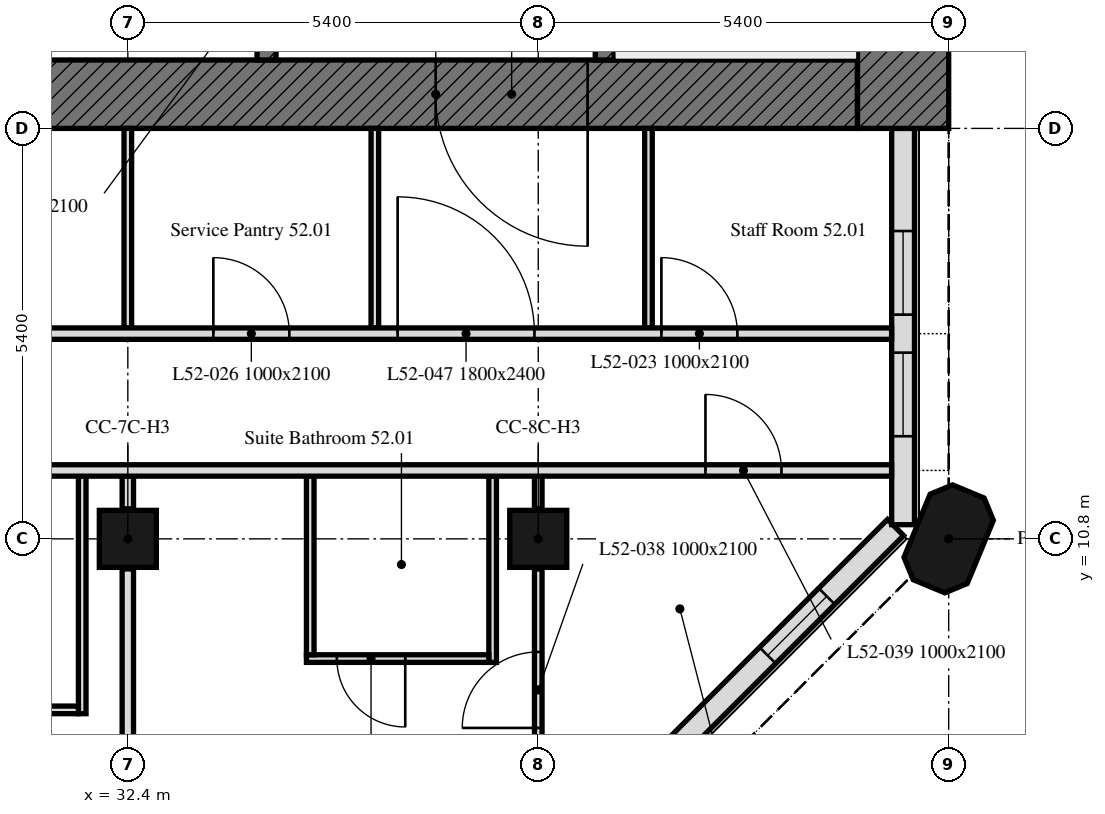
"""IFC4 building model, lengths in metres.
Left out: names, types, materials, properties, quantities, classifications, styles, units other than length and angle.
Written with IfcOpenShell. Run it as: python <this file> out.ifc"""

import sys

from ifc_helpers import new_model, si_unit, direction, frame, frame_2d, origin, origin_2d, place, context, subcontext, project, spatial, polyline, rectangle, outline, extrude, element, fill, save


model = new_model("IFC4")
c1 = context("Model", 3, precision=1e-05, world=origin(), true_north=direction((0.0, 1.0)))
c2 = subcontext(c1, "Body", "Model", "MODEL_VIEW")
j1 = project(units=[si_unit("LENGTHUNIT", "METRE"), si_unit("PLANEANGLEUNIT", "RADIAN")], contexts=[c1])
p1 = place(None, origin())
s1 = spatial("IfcSite", under=j1, at=p1, CompositionType="ELEMENT")
p2 = place(p1, origin())
s2 = spatial("IfcBuilding", under=s1, at=p2, CompositionType="ELEMENT")
p3 = place(p2, frame((0.0, 0.0, 210.4)))
s3 = spatial("IfcBuildingStorey", under=s2, at=p3, CompositionType="ELEMENT", Elevation=210.4)
for number, where, z_axis, x_axis in (
    (1, (32.4, 10.8, 0.0), (0.0, 0.0, 1.0), (1.0, 0.0, 0.0)),
    (2, (37.8, 10.8, 0.0), (0.0, 0.0, 1.0), (1.0, 0.0, 0.0)),
):
    element("IfcColumn", number, at=place(p3, frame(where, z_axis=z_axis, x_axis=x_axis)), inside=s3, PredefinedType="COLUMN", context=c2, shape_type="SweptSolid", body=[
        extrude(rectangle(XDim=0.75, YDim=0.75, at=origin_2d()), origin(), (0.0, 0.0, 1.0), 3.0),
    ])
p4 = place(p3, frame((43.2, 10.8, 0.0), z_axis=(0.0, 0.0, 1.0), x_axis=(0.382683432365, 0.923879532511, 0.0)))
e3 = element("IfcColumn", 3, at=p4, inside=s3, PredefinedType="COLUMN", context=c2, shape_type="SweptSolid", body=[
    extrude(outline(polyline([(-0.45, -0.45), (0.45, -0.45), (0.675, -0.225), (0.675, 0.225), (0.45, 0.45), (-0.45, 0.45), (-0.675, 0.225), (-0.675, -0.225), (-0.45, -0.45)])), origin(), (0.0, 0.0, 1.0), 3.0),
])
p5 = place(p3, frame((37.65, 6.099, 0.0), z_axis=(0.0, 0.0, 1.0), x_axis=(0.707106781187, 0.707106781187, 0.0)))
e4 = element("IfcWall", 4, at=p5, inside=s3, PredefinedType="SOLIDWALL", context=c2, shape_type="SweptSolid", body=[
    extrude(rectangle(XDim=6.86, YDim=0.3, at=frame_2d((3.43, 0.0))), origin(), (0.0, 0.0, 1.0), 3.0),
])
p6 = place(p5, frame((1.28, 0.0, 0.9)))
e5 = element("IfcOpeningElement", 5, at=p6, cuts=e4, PredefinedType="OPENING", context=c2, shape_type="SweptSolid", body=[
    extrude(rectangle(XDim=1.1, YDim=1.7, at=frame_2d((0.55, 0.85))), frame((0.0, 0.16, 0.0), z_axis=(0.0, -1.0, 0.0), x_axis=(1.0, 0.0, 0.0)), (0.0, 0.0, 1.0), 0.32),
])
p7 = place(p5, frame((4.48, 0.0, 0.9)))
e6 = element("IfcOpeningElement", 6, at=p7, cuts=e4, PredefinedType="OPENING", context=c2, shape_type="SweptSolid", body=[
    extrude(rectangle(XDim=1.1, YDim=1.7, at=frame_2d((0.55, 0.85))), frame((0.0, 0.16, 0.0), z_axis=(0.0, -1.0, 0.0), x_axis=(1.0, 0.0, 0.0)), (0.0, 0.0, 1.0), 0.32),
])
p8 = place(p3, frame((42.6, 10.986, 0.0), z_axis=(0.0, 0.0, 1.0), x_axis=(0.0, 1.0, 0.0)))
e7 = element("IfcWall", 7, at=p8, inside=s3, PredefinedType="SOLIDWALL", context=c2, shape_type="SweptSolid", body=[
    extrude(rectangle(XDim=5.214, YDim=0.3, at=frame_2d((2.607, 0.0))), origin(), (0.0, 0.0, 1.0), 3.0),
])
p9 = place(p8, frame((1.164, 0.0, 0.9)))
e8 = element("IfcOpeningElement", 8, at=p9, cuts=e7, PredefinedType="OPENING", context=c2, shape_type="SweptSolid", body=[
    extrude(rectangle(XDim=1.1, YDim=1.7, at=frame_2d((0.55, 0.85))), frame((0.0, 0.16, 0.0), z_axis=(0.0, -1.0, 0.0), x_axis=(1.0, 0.0, 0.0)), (0.0, 0.0, 1.0), 0.32),
])
p10 = place(p8, frame((2.764, 0.0, 0.9)))
e9 = element("IfcOpeningElement", 9, at=p10, cuts=e7, PredefinedType="OPENING", context=c2, shape_type="SweptSolid", body=[
    extrude(rectangle(XDim=1.1, YDim=1.7, at=frame_2d((0.55, 0.85))), frame((0.0, 0.16, 0.0), z_axis=(0.0, -1.0, 0.0), x_axis=(1.0, 0.0, 0.0)), (0.0, 0.0, 1.0), 0.32),
])
p11 = place(p3, frame((42.0, 16.65, 0.0), z_axis=(0.0, 0.0, 1.0), x_axis=(-1.0, 0.0, 0.0)))
e10 = element("IfcWall", 10, at=p11, inside=s3, PredefinedType="SOLIDWALL", context=c2, shape_type="SweptSolid", body=[
    extrude(rectangle(XDim=11.1, YDim=0.9, at=frame_2d((5.55, 0.0))), origin(), (0.0, 0.0, 1.0), 3.0),
])
p12 = place(p11, frame((3.55, 0.0, 0.0)))
e11 = element("IfcOpeningElement", 11, at=p12, cuts=e10, PredefinedType="OPENING", context=c2, shape_type="SweptSolid", body=[
    extrude(rectangle(XDim=2.0, YDim=2.4, at=frame_2d((1.0, 1.2))), frame((0.0, 0.45, 0.0), z_axis=(0.0, -1.0, 0.0), x_axis=(1.0, 0.0, 0.0)), (0.0, 0.0, 1.0), 0.9),
])
p13 = place(p3, frame((42.6, 32.4, 0.0), z_axis=(0.0, 0.0, 1.0), x_axis=(0.0, -1.0, 0.0)))
e12 = element("IfcWall", 12, at=p13, inside=s3, PredefinedType="SOLIDWALL", context=c2, shape_type="SweptSolid", body=[
    extrude(rectangle(XDim=16.2, YDim=1.2, at=frame_2d((8.1, 0.0))), origin(), (0.0, 0.0, 1.0), 3.0),
])
p14 = place(p3, frame((38.675, 17.1, 0.0), z_axis=(0.0, 0.0, 1.0), x_axis=(0.0, 1.0, 0.0)))
e13 = element("IfcWall", 13, at=p14, inside=s3, PredefinedType="SOLIDWALL", context=c2, shape_type="SweptSolid", body=[
    extrude(rectangle(XDim=14.4, YDim=0.25, at=frame_2d((7.2, 0.0))), origin(), (0.0, 0.0, 1.0), 3.0),
])
p15 = place(p14, frame((4.6, 0.0, 0.0)))
e14 = element("IfcOpeningElement", 14, at=p15, cuts=e13, PredefinedType="OPENING", context=c2, shape_type="SweptSolid", body=[
    extrude(rectangle(XDim=1.0, YDim=2.1, at=frame_2d((0.5, 1.05))), frame((0.0, 0.125, 0.0), z_axis=(0.0, -1.0, 0.0), x_axis=(1.0, 0.0, 0.0)), (0.0, 0.0, 1.0), 0.25),
])
p16 = place(p14, frame((7.062, 0.0, 0.0)))
e15 = element("IfcOpeningElement", 15, at=p16, cuts=e13, PredefinedType="OPENING", context=c2, shape_type="SweptSolid", body=[
    extrude(rectangle(XDim=1.2, YDim=2.1, at=frame_2d((0.6, 1.05))), frame((0.0, 0.125, 0.0), z_axis=(0.0, -1.0, 0.0), x_axis=(1.0, 0.0, 0.0)), (0.0, 0.0, 1.0), 0.25),
])
p17 = place(p14, frame((10.106, 0.0, 0.0)))
e16 = element("IfcOpeningElement", 16, at=p17, cuts=e13, PredefinedType="OPENING", context=c2, shape_type="SweptSolid", body=[
    extrude(rectangle(XDim=0.9, YDim=2.1, at=frame_2d((0.45, 1.05))), frame((0.0, 0.125, 0.0), z_axis=(0.0, -1.0, 0.0), x_axis=(1.0, 0.0, 0.0)), (0.0, 0.0, 1.0), 0.25),
])
p18 = place(p14, frame((12.048, 0.0, 0.0)))
e17 = element("IfcOpeningElement", 17, at=p18, cuts=e13, PredefinedType="OPENING", context=c2, shape_type="SweptSolid", body=[
    extrude(rectangle(XDim=0.9, YDim=2.1, at=frame_2d((0.45, 1.05))), frame((0.0, 0.125, 0.0), z_axis=(0.0, -1.0, 0.0), x_axis=(1.0, 0.0, 0.0)), (0.0, 0.0, 1.0), 0.25),
])
p19 = place(p14, frame((13.354, 0.0, 0.0)))
e18 = element("IfcOpeningElement", 18, at=p19, cuts=e13, PredefinedType="OPENING", context=c2, shape_type="SweptSolid", body=[
    extrude(rectangle(XDim=0.9, YDim=2.1, at=frame_2d((0.45, 1.05))), frame((0.0, 0.125, 0.0), z_axis=(0.0, -1.0, 0.0), x_axis=(1.0, 0.0, 0.0)), (0.0, 0.0, 1.0), 0.25),
])
p20 = place(p3, frame((34.225, 17.1, 0.0), z_axis=(0.0, 0.0, 1.0), x_axis=(0.0, 1.0, 0.0)))
e19 = element("IfcWall", 19, at=p20, inside=s3, PredefinedType="SOLIDWALL", context=c2, shape_type="SweptSolid", body=[
    extrude(rectangle(XDim=14.4, YDim=0.25, at=frame_2d((7.2, 0.0))), origin(), (0.0, 0.0, 1.0), 3.0),
])
p21 = place(p20, frame((13.15, 0.0, 0.0)))
e20 = element("IfcOpeningElement", 20, at=p21, cuts=e19, PredefinedType="OPENING", context=c2, shape_type="SweptSolid", body=[
    extrude(rectangle(XDim=1.0, YDim=2.1, at=frame_2d((0.5, 1.05))), frame((0.0, 0.125, 0.0), z_axis=(0.0, -1.0, 0.0), x_axis=(1.0, 0.0, 0.0)), (0.0, 0.0, 1.0), 0.25),
])
p22 = place(p20, frame((0.6, 0.0, 0.0)))
e21 = element("IfcOpeningElement", 21, at=p22, cuts=e19, PredefinedType="OPENING", context=c2, shape_type="SweptSolid", body=[
    extrude(rectangle(XDim=1.1, YDim=2.1, at=frame_2d((0.55, 1.05))), frame((0.0, 0.125, 0.0), z_axis=(0.0, -1.0, 0.0), x_axis=(1.0, 0.0, 0.0)), (0.0, 0.0, 1.0), 0.25),
])
p23 = place(p20, frame((3.25, 0.0, 0.0)))
e22 = element("IfcOpeningElement", 22, at=p23, cuts=e19, PredefinedType="OPENING", context=c2, shape_type="SweptSolid", body=[
    extrude(rectangle(XDim=0.9, YDim=2.1, at=frame_2d((0.45, 1.05))), frame((0.0, 0.125, 0.0), z_axis=(0.0, -1.0, 0.0), x_axis=(1.0, 0.0, 0.0)), (0.0, 0.0, 1.0), 0.25),
])
p24 = place(p3, frame((37.8, 6.512, 0.0), z_axis=(0.0, 0.0, 1.0), x_axis=(0.0, 1.0, 0.0)))
e23 = element("IfcWall", 23, at=p24, inside=s3, PredefinedType="PARTITIONING", context=c2, shape_type="SweptSolid", body=[
    extrude(rectangle(XDim=3.893, YDim=0.1, at=frame_2d((1.946, 0.0))), origin(), (0.0, 0.0, 1.0), 3.0),
])
p25 = place(p24, frame((1.8, 0.0, 0.0)))
e24 = element("IfcOpeningElement", 24, at=p25, cuts=e23, PredefinedType="OPENING", context=c2, shape_type="SweptSolid", body=[
    extrude(rectangle(XDim=1.0, YDim=2.1, at=frame_2d((0.5, 1.05))), frame((0.0, 0.05, 0.0), z_axis=(0.0, -1.0, 0.0), x_axis=(1.0, 0.0, 0.0)), (0.0, 0.0, 1.0), 0.1),
])
p26 = place(p3, frame((37.8, 11.195, 0.0), z_axis=(0.0, 0.0, 1.0), x_axis=(0.0, 1.0, 0.0)))
e25 = element("IfcWall", 25, at=p26, inside=s3, PredefinedType="PARTITIONING", context=c2, shape_type="SweptSolid", body=[
    extrude(rectangle(XDim=0.43, YDim=0.1, at=frame_2d((0.215, 0.0))), origin(), (0.0, 0.0, 1.0), 3.0),
])
p27 = place(p3, frame((37.2, 11.625, 0.0), z_axis=(0.0, 0.0, 1.0), x_axis=(0.0, -1.0, 0.0)))
e26 = element("IfcWall", 26, at=p27, inside=s3, PredefinedType="PARTITIONING", context=c2, shape_type="SweptSolid", body=[
    extrude(rectangle(XDim=2.45, YDim=0.1, at=frame_2d((1.225, 0.0))), origin(), (0.0, 0.0, 1.0), 3.0),
])
p28 = place(p3, frame((37.15, 9.225, 0.0), z_axis=(0.0, 0.0, 1.0), x_axis=(-1.0, 0.0, 0.0)))
e27 = element("IfcWall", 27, at=p28, inside=s3, PredefinedType="PARTITIONING", context=c2, shape_type="SweptSolid", body=[
    extrude(rectangle(XDim=2.4, YDim=0.1, at=frame_2d((1.2, 0.0))), origin(), (0.0, 0.0, 1.0), 3.0),
])
p29 = place(p28, frame((1.1, 0.0, 0.0)))
e28 = element("IfcOpeningElement", 28, at=p29, cuts=e27, PredefinedType="OPENING", context=c2, shape_type="SweptSolid", body=[
    extrude(rectangle(XDim=0.9, YDim=2.1, at=frame_2d((0.45, 1.05))), frame((0.0, 0.05, 0.0), z_axis=(0.0, -1.0, 0.0), x_axis=(1.0, 0.0, 0.0)), (0.0, 0.0, 1.0), 0.1),
])
p30 = place(p3, frame((34.8, 9.275, 0.0), z_axis=(0.0, 0.0, 1.0), x_axis=(0.0, 1.0, 0.0)))
e29 = element("IfcWall", 29, at=p30, inside=s3, PredefinedType="PARTITIONING", context=c2, shape_type="SweptSolid", body=[
    extrude(rectangle(XDim=2.35, YDim=0.1, at=frame_2d((1.175, 0.0))), origin(), (0.0, 0.0, 1.0), 3.0),
])
p31 = place(p3, frame((32.4, 11.625, 0.0), z_axis=(0.0, 0.0, 1.0), x_axis=(0.0, -1.0, 0.0)))
e30 = element("IfcWall", 30, at=p31, inside=s3, PredefinedType="PARTITIONING", context=c2, shape_type="SweptSolid", body=[
    extrude(rectangle(XDim=0.43, YDim=0.15, at=frame_2d((0.215, 0.0))), origin(), (0.0, 0.0, 1.0), 3.0),
])
p32 = place(p3, frame((32.4, 10.405, 0.0), z_axis=(0.0, 0.0, 1.0), x_axis=(0.0, -1.0, 0.0)))
e31 = element("IfcWall", 31, at=p32, inside=s3, PredefinedType="PARTITIONING", context=c2, shape_type="SweptSolid", body=[
    extrude(rectangle(XDim=4.254, YDim=0.15, at=frame_2d((2.127, 0.0))), origin(), (0.0, 0.0, 1.0), 3.0),
])
p33 = place(p3, frame((31.8, 11.625, 0.0), z_axis=(0.0, 0.0, 1.0), x_axis=(0.0, -1.0, 0.0)))
e32 = element("IfcWall", 32, at=p33, inside=s3, PredefinedType="PARTITIONING", context=c2, shape_type="SweptSolid", body=[
    extrude(rectangle(XDim=3.125, YDim=0.1, at=frame_2d((1.562, 0.0))), origin(), (0.0, 0.0, 1.0), 3.0),
])
p34 = place(p3, frame((31.75, 8.55, 0.0), z_axis=(0.0, 0.0, 1.0), x_axis=(-1.0, 0.0, 0.0)))
e33 = element("IfcWall", 33, at=p34, inside=s3, PredefinedType="PARTITIONING", context=c2, shape_type="SweptSolid", body=[
    extrude(rectangle(XDim=2.1, YDim=0.1, at=frame_2d((1.05, 0.0))), origin(), (0.0, 0.0, 1.0), 3.0),
])
p35 = place(p3, frame((0.751, 11.7, 0.0), z_axis=(0.0, 0.0, 1.0), x_axis=(1.0, 0.0, 0.0)))
e34 = element("IfcWall", 34, at=p35, inside=s3, PredefinedType="PARTITIONING", context=c2, shape_type="SweptSolid", body=[
    extrude(rectangle(XDim=41.698, YDim=0.15, at=frame_2d((20.849, 0.0))), origin(), (0.0, 0.0, 1.0), 3.0),
])
p36 = place(p35, frame((39.249, 0.0, 0.0)))
e35 = element("IfcOpeningElement", 35, at=p36, cuts=e34, PredefinedType="OPENING", context=c2, shape_type="SweptSolid", body=[
    extrude(rectangle(XDim=1.0, YDim=2.1, at=frame_2d((0.5, 1.05))), frame((0.0, 0.075, 0.0), z_axis=(0.0, -1.0, 0.0), x_axis=(1.0, 0.0, 0.0)), (0.0, 0.0, 1.0), 0.15),
])
p37 = place(p35, frame((27.649, 0.0, 0.0)))
e36 = element("IfcOpeningElement", 36, at=p37, cuts=e34, PredefinedType="OPENING", context=c2, shape_type="SweptSolid", body=[
    extrude(rectangle(XDim=1.0, YDim=2.1, at=frame_2d((0.5, 1.05))), frame((0.0, 0.075, 0.0), z_axis=(0.0, -1.0, 0.0), x_axis=(1.0, 0.0, 0.0)), (0.0, 0.0, 1.0), 0.15),
])
p38 = place(p35, frame((22.249, 0.0, 0.0)))
e37 = element("IfcOpeningElement", 37, at=p38, cuts=e34, PredefinedType="OPENING", context=c2, shape_type="SweptSolid", body=[
    extrude(rectangle(XDim=1.0, YDim=2.1, at=frame_2d((0.5, 1.05))), frame((0.0, 0.075, 0.0), z_axis=(0.0, -1.0, 0.0), x_axis=(1.0, 0.0, 0.0)), (0.0, 0.0, 1.0), 0.15),
])
p39 = place(p35, frame((16.849, 0.0, 0.0)))
e38 = element("IfcOpeningElement", 38, at=p39, cuts=e34, PredefinedType="OPENING", context=c2, shape_type="SweptSolid", body=[
    extrude(rectangle(XDim=1.0, YDim=2.1, at=frame_2d((0.5, 1.05))), frame((0.0, 0.075, 0.0), z_axis=(0.0, -1.0, 0.0), x_axis=(1.0, 0.0, 0.0)), (0.0, 0.0, 1.0), 0.15),
])
p40 = place(p35, frame((11.449, 0.0, 0.0)))
e39 = element("IfcOpeningElement", 39, at=p40, cuts=e34, PredefinedType="OPENING", context=c2, shape_type="SweptSolid", body=[
    extrude(rectangle(XDim=1.0, YDim=2.1, at=frame_2d((0.5, 1.05))), frame((0.0, 0.075, 0.0), z_axis=(0.0, -1.0, 0.0), x_axis=(1.0, 0.0, 0.0)), (0.0, 0.0, 1.0), 0.15),
])
p41 = place(p35, frame((2.744, 0.0, 0.0)))
e40 = element("IfcOpeningElement", 40, at=p41, cuts=e34, PredefinedType="OPENING", context=c2, shape_type="SweptSolid", body=[
    extrude(rectangle(XDim=1.0, YDim=2.1, at=frame_2d((0.5, 1.05))), frame((0.0, 0.075, 0.0), z_axis=(0.0, -1.0, 0.0), x_axis=(1.0, 0.0, 0.0)), (0.0, 0.0, 1.0), 0.15),
])
for number, where, z_axis, x_axis in (
    (41, (32.4, 13.575, 0.0), (0.0, 0.0, 1.0), (0.0, 1.0, 0.0)),
    (42, (39.25, 13.575, 0.0), (0.0, 0.0, 1.0), (0.0, 1.0, 0.0)),
    (43, (35.65, 16.2, 0.0), (0.0, 0.0, 1.0), (0.0, -1.0, 0.0)),
):
    element("IfcWall", number, at=place(p3, frame(where, z_axis=z_axis, x_axis=x_axis)), inside=s3, PredefinedType="PARTITIONING", context=c2, shape_type="SweptSolid", body=[
        extrude(rectangle(XDim=2.625, YDim=0.1, at=frame_2d((1.312, 0.0))), origin(), (0.0, 0.0, 1.0), 3.0),
    ])
p42 = place(p3, frame((16.3, 13.5, 0.0), z_axis=(0.0, 0.0, 1.0), x_axis=(1.0, 0.0, 0.0)))
e44 = element("IfcWall", 44, at=p42, inside=s3, PredefinedType="PARTITIONING", context=c2, shape_type="SweptSolid", body=[
    extrude(rectangle(XDim=26.149, YDim=0.15, at=frame_2d((13.074, 0.0))), origin(), (0.0, 0.0, 1.0), 3.0),
])
p43 = place(p42, frame((7.5, 0.0, 0.0)))
e45 = element("IfcOpeningElement", 45, at=p43, cuts=e44, PredefinedType="OPENING", context=c2, shape_type="SweptSolid", body=[
    extrude(rectangle(XDim=1.0, YDim=2.1, at=frame_2d((0.5, 1.05))), frame((0.0, 0.075, 0.0), z_axis=(0.0, -1.0, 0.0), x_axis=(1.0, 0.0, 0.0)), (0.0, 0.0, 1.0), 0.15),
])
p44 = place(p42, frame((23.12, 0.0, 0.0)))
e46 = element("IfcOpeningElement", 46, at=p44, cuts=e44, PredefinedType="OPENING", context=c2, shape_type="SweptSolid", body=[
    extrude(rectangle(XDim=1.0, YDim=2.1, at=frame_2d((0.5, 1.05))), frame((0.0, 0.075, 0.0), z_axis=(0.0, -1.0, 0.0), x_axis=(1.0, 0.0, 0.0)), (0.0, 0.0, 1.0), 0.15),
])
p45 = place(p42, frame((17.225, 0.0, 0.0)))
e47 = element("IfcOpeningElement", 47, at=p45, cuts=e44, PredefinedType="OPENING", context=c2, shape_type="SweptSolid", body=[
    extrude(rectangle(XDim=1.0, YDim=2.1, at=frame_2d((0.5, 1.05))), frame((0.0, 0.075, 0.0), z_axis=(0.0, -1.0, 0.0), x_axis=(1.0, 0.0, 0.0)), (0.0, 0.0, 1.0), 0.15),
])
p46 = place(p42, frame((19.65, 0.0, 0.0)))
e48 = element("IfcOpeningElement", 48, at=p46, cuts=e44, PredefinedType="OPENING", context=c2, shape_type="SweptSolid", body=[
    extrude(rectangle(XDim=1.8, YDim=2.4, at=frame_2d((0.9, 1.2))), frame((0.0, 0.075, 0.0), z_axis=(0.0, -1.0, 0.0), x_axis=(1.0, 0.0, 0.0)), (0.0, 0.0, 1.0), 0.15),
])
p47 = place(p7, origin())
e49 = element("IfcWindow", 49, at=p47, inside=s3, PartitioningType="SINGLE_PANEL", PredefinedType="WINDOW", context=c2, shape_type="SweptSolid", body=[
    extrude(rectangle(XDim=1.1, YDim=1.7, at=frame_2d((0.55, 0.85))), frame((0.0, 0.03, 0.0), z_axis=(0.0, -1.0, 0.0), x_axis=(1.0, 0.0, 0.0)), (0.0, 0.0, 1.0), 0.06),
])
fill(e6, e49)
p48 = place(p9, origin())
e50 = element("IfcWindow", 50, at=p48, inside=s3, PartitioningType="SINGLE_PANEL", PredefinedType="WINDOW", context=c2, shape_type="SweptSolid", body=[
    extrude(rectangle(XDim=1.1, YDim=1.7, at=frame_2d((0.55, 0.85))), frame((0.0, 0.03, 0.0), z_axis=(0.0, -1.0, 0.0), x_axis=(1.0, 0.0, 0.0)), (0.0, 0.0, 1.0), 0.06),
])
fill(e8, e50)
p49 = place(p10, origin())
e51 = element("IfcWindow", 51, at=p49, inside=s3, PartitioningType="SINGLE_PANEL", PredefinedType="WINDOW", context=c2, shape_type="SweptSolid", body=[
    extrude(rectangle(XDim=1.1, YDim=1.7, at=frame_2d((0.55, 0.85))), frame((0.0, 0.03, 0.0), z_axis=(0.0, -1.0, 0.0), x_axis=(1.0, 0.0, 0.0)), (0.0, 0.0, 1.0), 0.06),
])
fill(e9, e51)
p50 = place(p12, origin())
e52 = element("IfcDoor", 52, at=p50, inside=s3, OperationType="DOUBLE_DOOR_SINGLE_SWING", PredefinedType="DOOR", context=c2, shape_type="SweptSolid", body=[
    extrude(rectangle(XDim=2.0, YDim=2.4, at=frame_2d((1.0, 1.2))), frame((0.0, 0.025, 0.0), z_axis=(0.0, -1.0, 0.0), x_axis=(1.0, 0.0, 0.0)), (0.0, 0.0, 1.0), 0.05),
])
fill(e11, e52)
p51 = place(p29, origin())
e53 = element("IfcDoor", 53, at=p51, inside=s3, OperationType="SINGLE_SWING_LEFT", PredefinedType="DOOR", context=c2, shape_type="SweptSolid", body=[
    extrude(rectangle(XDim=0.9, YDim=2.1, at=frame_2d((0.45, 1.05))), frame((0.0, 0.025, 0.0), z_axis=(0.0, -1.0, 0.0), x_axis=(1.0, 0.0, 0.0)), (0.0, 0.0, 1.0), 0.05),
])
fill(e28, e53)
p52 = place(p44, origin())
e54 = element("IfcDoor", 54, at=p52, inside=s3, OperationType="SINGLE_SWING_LEFT", PredefinedType="DOOR", context=c2, shape_type="SweptSolid", body=[
    extrude(rectangle(XDim=1.0, YDim=2.1, at=frame_2d((0.5, 1.05))), frame((0.0, 0.025, 0.0), z_axis=(0.0, -1.0, 0.0), x_axis=(1.0, 0.0, 0.0)), (0.0, 0.0, 1.0), 0.05),
])
fill(e46, e54)
p53 = place(p45, origin())
e55 = element("IfcDoor", 55, at=p53, inside=s3, OperationType="SINGLE_SWING_RIGHT", PredefinedType="DOOR", context=c2, shape_type="SweptSolid", body=[
    extrude(rectangle(XDim=1.0, YDim=2.1, at=frame_2d((0.5, 1.05))), frame((0.0, 0.025, 0.0), z_axis=(0.0, -1.0, 0.0), x_axis=(1.0, 0.0, 0.0)), (0.0, 0.0, 1.0), 0.05),
])
fill(e47, e55)
p54 = place(p25, origin())
e56 = element("IfcDoor", 56, at=p54, inside=s3, OperationType="SINGLE_SWING_LEFT", PredefinedType="DOOR", context=c2, shape_type="SweptSolid", body=[
    extrude(rectangle(XDim=1.0, YDim=2.1, at=frame_2d((0.5, 1.05))), frame((0.0, 0.025, 0.0), z_axis=(0.0, -1.0, 0.0), x_axis=(1.0, 0.0, 0.0)), (0.0, 0.0, 1.0), 0.05),
])
fill(e24, e56)
p55 = place(p36, origin())
e57 = element("IfcDoor", 57, at=p55, inside=s3, OperationType="SINGLE_SWING_RIGHT", PredefinedType="DOOR", context=c2, shape_type="SweptSolid", body=[
    extrude(rectangle(XDim=1.0, YDim=2.1, at=frame_2d((0.5, 1.05))), frame((0.0, 0.025, 0.0), z_axis=(0.0, -1.0, 0.0), x_axis=(1.0, 0.0, 0.0)), (0.0, 0.0, 1.0), 0.05),
])
fill(e35, e57)
p56 = place(p46, origin())
e58 = element("IfcDoor", 58, at=p56, inside=s3, OperationType="DOUBLE_DOOR_SINGLE_SWING", PredefinedType="DOOR", context=c2, shape_type="SweptSolid", body=[
    extrude(rectangle(XDim=1.8, YDim=2.4, at=frame_2d((0.9, 1.2))), frame((0.0, 0.025, 0.0), z_axis=(0.0, -1.0, 0.0), x_axis=(1.0, 0.0, 0.0)), (0.0, 0.0, 1.0), 0.05),
])
fill(e48, e58)
save(model, sys.argv[1])
